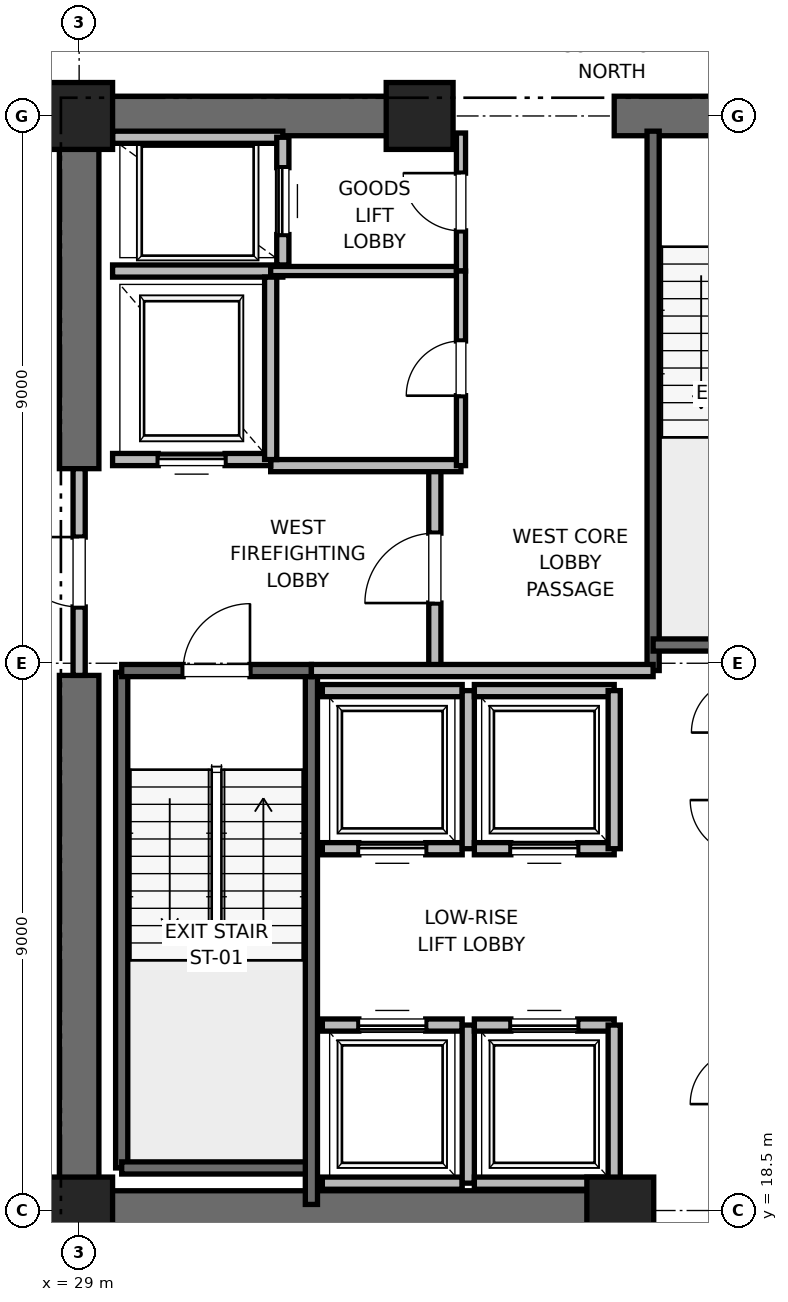
"""IFC4 building model, lengths in metres.
Left out: names, types, materials, properties, quantities, classifications, styles, units other than length and angle.
Written with IfcOpenShell. Run it as: python <this file> out.ifc"""

import sys

from ifc_helpers import new_model, si_unit, direction, frame, frame_2d, origin, origin_2d, place, context, subcontext, project, spatial, rectangle, extrude, element, fill, save


model = new_model("IFC4")
c1 = context("Model", 3, precision=1e-05, world=origin(), true_north=direction((0.0, 1.0)))
c2 = subcontext(c1, "Body", "Model", "MODEL_VIEW")
j1 = project(units=[si_unit("LENGTHUNIT", "METRE"), si_unit("PLANEANGLEUNIT", "RADIAN")], contexts=[c1])
p1 = place(None, origin())
s1 = spatial("IfcSite", under=j1, at=p1, CompositionType="ELEMENT")
p2 = place(p1, origin())
s2 = spatial("IfcBuilding", under=s1, at=p2, CompositionType="ELEMENT")
p3 = place(p2, frame((0.0, 0.0, 55.6)))
s3 = spatial("IfcBuildingStorey", under=s2, at=p3, CompositionType="ELEMENT", Elevation=55.6)
for number, where, z_axis, x_axis in (
    (1, (29.0, 18.5, 0.0), (0.0, 0.0, 1.0), (1.0, 0.0, 0.0)),
    (2, (29.0, 36.5, 0.0), (0.0, 0.0, 1.0), (1.0, 0.0, 0.0)),
    (3, (37.9, 18.5, 0.0), (0.0, 0.0, 1.0), (1.0, 0.0, 0.0)),
    (4, (34.6, 36.5, 0.0), (0.0, 0.0, 1.0), (1.0, 0.0, 0.0)),
):
    element("IfcColumn", number, at=place(p3, frame(where, z_axis=z_axis, x_axis=x_axis)), inside=s3, PredefinedType="PILASTER", context=c2, shape_type="SweptSolid", body=[
        extrude(rectangle(XDim=1.1, YDim=1.1, at=origin_2d()), origin(), (0.0, 0.0, 1.0), 4.0),
    ])
p4 = place(p3, frame((29.0, 18.5, 0.0), z_axis=(0.0, 0.0, 1.0), x_axis=(1.0, 0.0, 0.0)))
e5 = element("IfcWall", 5, at=p4, inside=s3, PredefinedType="SHEAR", context=c2, shape_type="SweptSolid", body=[
    extrude(rectangle(XDim=9.2, YDim=0.65, at=frame_2d((4.6, 0.0))), origin(), (0.0, 0.0, 1.0), 3.76),
])
p5 = place(p3, frame((29.0, 36.5, 0.0), z_axis=(0.0, 0.0, 1.0), x_axis=(1.0, 0.0, 0.0)))
e6 = element("IfcWall", 6, at=p5, inside=s3, PredefinedType="SHEAR", context=c2, shape_type="SweptSolid", body=[
    extrude(rectangle(XDim=5.8, YDim=0.65, at=frame_2d((2.9, 0.0))), origin(), (0.0, 0.0, 1.0), 3.76),
])
p6 = place(p3, frame((37.8, 36.5, 0.0), z_axis=(0.0, 0.0, 1.0), x_axis=(1.0, 0.0, 0.0)))
e7 = element("IfcWall", 7, at=p6, inside=s3, PredefinedType="SHEAR", context=c2, shape_type="SweptSolid", body=[
    extrude(rectangle(XDim=4.4, YDim=0.65, at=frame_2d((2.2, 0.0))), origin(), (0.0, 0.0, 1.0), 3.76),
])
p7 = place(p6, frame((1.65, 0.0, 0.0)))
e8 = element("IfcOpeningElement", 8, at=p7, cuts=e7, PredefinedType="OPENING", context=c2, shape_type="SweptSolid", body=[
    extrude(rectangle(XDim=1.1, YDim=2.15, at=frame_2d((0.55, 1.075))), frame((0.0, 0.325, 0.0), z_axis=(0.0, -1.0, 0.0), x_axis=(1.0, 0.0, 0.0)), (0.0, 0.0, 1.0), 0.65),
])
p8 = place(p3, frame((29.0, 18.5, 0.0), z_axis=(0.0, 0.0, 1.0), x_axis=(0.0, 1.0, 0.0)))
e9 = element("IfcWall", 9, at=p8, inside=s3, PredefinedType="SHEAR", context=c2, shape_type="SweptSolid", body=[
    extrude(rectangle(XDim=8.8, YDim=0.65, at=frame_2d((4.4, 0.0))), origin(), (0.0, 0.0, 1.0), 3.76),
])
p9 = place(p3, frame((29.0, 30.7, 0.0), z_axis=(0.0, 0.0, 1.0), x_axis=(0.0, 1.0, 0.0)))
e10 = element("IfcWall", 10, at=p9, inside=s3, PredefinedType="SHEAR", context=c2, shape_type="SweptSolid", body=[
    extrude(rectangle(XDim=5.8, YDim=0.65, at=frame_2d((2.9, 0.0))), origin(), (0.0, 0.0, 1.0), 3.76),
])
p10 = place(p3, frame((29.7, 19.2, 0.0), z_axis=(0.0, 0.0, 1.0), x_axis=(0.0, 1.0, 0.0)))
e11 = element("IfcWall", 11, at=p10, inside=s3, PredefinedType="SOLIDWALL", context=c2, shape_type="SweptSolid", body=[
    extrude(rectangle(XDim=8.15, YDim=0.2, at=frame_2d((4.075, 0.0))), origin(), (0.0, 0.0, 1.0), 3.76),
])
p11 = place(p3, frame((29.7, 19.2, 0.0), z_axis=(0.0, 0.0, 1.0), x_axis=(1.0, 0.0, 0.0)))
e12 = element("IfcWall", 12, at=p11, inside=s3, PredefinedType="SOLIDWALL", context=c2, shape_type="SweptSolid", body=[
    extrude(rectangle(XDim=3.12, YDim=0.2, at=frame_2d((1.56, 0.0))), origin(), (0.0, 0.0, 1.0), 3.76),
])
p12 = place(p3, frame((32.82, 18.6, 0.0), z_axis=(0.0, 0.0, 1.0), x_axis=(0.0, 1.0, 0.0)))
e13 = element("IfcWall", 13, at=p12, inside=s3, PredefinedType="SOLIDWALL", context=c2, shape_type="SweptSolid", body=[
    extrude(rectangle(XDim=8.78, YDim=0.2, at=frame_2d((4.39, 0.0))), origin(), (0.0, 0.0, 1.0), 3.76),
])
p13 = place(p3, frame((29.7, 27.38, 0.0), z_axis=(0.0, 0.0, 1.0), x_axis=(1.0, 0.0, 0.0)))
e14 = element("IfcWall", 14, at=p13, inside=s3, PredefinedType="SOLIDWALL", context=c2, shape_type="SweptSolid", body=[
    extrude(rectangle(XDim=3.12, YDim=0.2, at=frame_2d((1.56, 0.0))), origin(), (0.0, 0.0, 1.0), 3.76),
])
p14 = place(p13, frame((1.01, 0.0, 0.0)))
e15 = element("IfcOpeningElement", 15, at=p14, cuts=e14, PredefinedType="OPENING", context=c2, shape_type="SweptSolid", body=[
    extrude(rectangle(XDim=1.1, YDim=2.15, at=frame_2d((0.55, 1.075))), frame((0.0, 0.1, 0.0), z_axis=(0.0, -1.0, 0.0), x_axis=(1.0, 0.0, 0.0)), (0.0, 0.0, 1.0), 0.2),
])
p15 = place(p3, frame((38.44, 27.38, 0.0), z_axis=(0.0, 0.0, 1.0), x_axis=(0.0, 1.0, 0.0)))
e16 = element("IfcWall", 16, at=p15, inside=s3, PredefinedType="SOLIDWALL", context=c2, shape_type="SweptSolid", body=[
    extrude(rectangle(XDim=8.87, YDim=0.2, at=frame_2d((4.435, 0.0))), origin(), (0.0, 0.0, 1.0), 3.76),
])
p16 = place(p3, frame((38.44, 27.8, 0.0), z_axis=(0.0, 0.0, 1.0), x_axis=(1.0, 0.0, 0.0)))
e17 = element("IfcWall", 17, at=p16, inside=s3, PredefinedType="SOLIDWALL", context=c2, shape_type="SweptSolid", body=[
    extrude(rectangle(XDim=3.32, YDim=0.2, at=frame_2d((1.66, 0.0))), origin(), (0.0, 0.0, 1.0), 3.76),
])
p17 = place(p3, frame((34.85, 27.38, 0.0), z_axis=(0.0, 0.0, 1.0), x_axis=(0.0, 1.0, 0.0)))
e18 = element("IfcWall", 18, at=p17, inside=s3, PredefinedType="PARTITIONING", context=c2, shape_type="SweptSolid", body=[
    extrude(rectangle(XDim=3.37, YDim=0.2, at=frame_2d((1.685, 0.0))), origin(), (0.0, 0.0, 1.0), 3.76),
])
p18 = place(p17, frame((1.11, 0.0, 0.0)))
e19 = element("IfcOpeningElement", 19, at=p18, cuts=e18, PredefinedType="OPENING", context=c2, shape_type="SweptSolid", body=[
    extrude(rectangle(XDim=1.15, YDim=2.2, at=frame_2d((0.575, 1.1))), frame((0.0, 0.1, 0.0), z_axis=(0.0, -1.0, 0.0), x_axis=(1.0, 0.0, 0.0)), (0.0, 0.0, 1.0), 0.2),
])
p19 = place(p3, frame((29.0, 27.3, 0.0), z_axis=(0.0, 0.0, 1.0), x_axis=(0.0, 1.0, 0.0)))
e20 = element("IfcWall", 20, at=p19, inside=s3, PredefinedType="PARTITIONING", context=c2, shape_type="SweptSolid", body=[
    extrude(rectangle(XDim=3.4, YDim=0.2, at=frame_2d((1.7, 0.0))), origin(), (0.0, 0.0, 1.0), 2.54),
])
p20 = place(p19, frame((1.125, 0.0, 0.0)))
e21 = element("IfcOpeningElement", 21, at=p20, cuts=e20, PredefinedType="OPENING", context=c2, shape_type="SweptSolid", body=[
    extrude(rectangle(XDim=1.15, YDim=2.2, at=frame_2d((0.575, 1.1))), frame((0.0, 0.1, 0.0), z_axis=(0.0, -1.0, 0.0), x_axis=(1.0, 0.0, 0.0)), (0.0, 0.0, 1.0), 0.2),
])
p21 = place(p3, frame((32.82, 27.38, 0.0), z_axis=(0.0, 0.0, 1.0), x_axis=(1.0, 0.0, 0.0)))
e22 = element("IfcWall", 22, at=p21, inside=s3, PredefinedType="PARTITIONING", context=c2, shape_type="SweptSolid", body=[
    extrude(rectangle(XDim=5.62, YDim=0.2, at=frame_2d((2.81, 0.0))), origin(), (0.0, 0.0, 1.0), 3.76),
])
p22 = place(p3, frame((32.15, 30.75, 0.0), z_axis=(0.0, 0.0, 1.0), x_axis=(1.0, 0.0, 0.0)))
e23 = element("IfcWall", 23, at=p22, inside=s3, PredefinedType="PARTITIONING", context=c2, shape_type="SweptSolid", body=[
    extrude(rectangle(XDim=3.13, YDim=0.2, at=frame_2d((1.565, 0.0))), origin(), (0.0, 0.0, 1.0), 3.76),
])
p23 = place(p3, frame((29.55, 30.85, 0.0), z_axis=(0.0, 0.0, 1.0), x_axis=(1.0, 0.0, 0.0)))
e24 = element("IfcWall", 24, at=p23, inside=s3, PredefinedType="SOLIDWALL", context=c2, shape_type="SweptSolid", body=[
    extrude(rectangle(XDim=2.6, YDim=0.2, at=frame_2d((1.3, 0.0))), origin(), (0.0, 0.0, 1.0), 2.54),
])
p24 = place(p23, frame((0.75, 0.0, 0.0)))
e25 = element("IfcOpeningElement", 25, at=p24, cuts=e24, PredefinedType="OPENING", context=c2, shape_type="SweptSolid", body=[
    extrude(rectangle(XDim=1.1, YDim=2.2, at=frame_2d((0.55, 1.1))), frame((0.0, 0.1, 0.0), z_axis=(0.0, -1.0, 0.0), x_axis=(1.0, 0.0, 0.0)), (0.0, 0.0, 1.0), 0.2),
])
p25 = place(p3, frame((29.55, 33.95, 0.0), z_axis=(0.0, 0.0, 1.0), x_axis=(1.0, 0.0, 0.0)))
e26 = element("IfcWall", 26, at=p25, inside=s3, PredefinedType="SOLIDWALL", context=c2, shape_type="SweptSolid", body=[
    extrude(rectangle(XDim=2.8, YDim=0.2, at=frame_2d((1.4, 0.0))), origin(), (0.0, 0.0, 1.0), 3.76),
])
p26 = place(p3, frame((32.15, 30.85, 0.0), z_axis=(0.0, 0.0, 1.0), x_axis=(0.0, 1.0, 0.0)))
e27 = element("IfcWall", 27, at=p26, inside=s3, PredefinedType="SOLIDWALL", context=c2, shape_type="SweptSolid", body=[
    extrude(rectangle(XDim=3.0, YDim=0.2, at=frame_2d((1.5, 0.0))), origin(), (0.0, 0.0, 1.0), 3.76),
])
p27 = place(p3, frame((32.35, 36.15, 0.0), z_axis=(0.0, 0.0, 1.0), x_axis=(-1.0, 0.0, 0.0)))
e28 = element("IfcWall", 28, at=p27, inside=s3, PredefinedType="SOLIDWALL", context=c2, shape_type="SweptSolid", body=[
    extrude(rectangle(XDim=2.8, YDim=0.2, at=frame_2d((1.4, 0.0))), origin(), (0.0, 0.0, 1.0), 2.889),
])
p28 = place(p3, frame((32.35, 34.05, 0.0), z_axis=(0.0, 0.0, 1.0), x_axis=(0.0, 1.0, 0.0)))
e29 = element("IfcWall", 29, at=p28, inside=s3, PredefinedType="SOLIDWALL", context=c2, shape_type="SweptSolid", body=[
    extrude(rectangle(XDim=2.1, YDim=0.2, at=frame_2d((1.05, 0.0))), origin(), (0.0, 0.0, 1.0), 3.76),
])
p29 = place(p28, frame((0.5, 0.0, 0.0)))
e30 = element("IfcOpeningElement", 30, at=p29, cuts=e29, PredefinedType="OPENING", context=c2, shape_type="SweptSolid", body=[
    extrude(rectangle(XDim=1.1, YDim=2.2, at=frame_2d((0.55, 1.1))), frame((0.0, 0.1, 0.0), z_axis=(0.0, -1.0, 0.0), x_axis=(1.0, 0.0, 0.0)), (0.0, 0.0, 1.0), 0.2),
])
p30 = place(p3, frame((33.0, 18.95, 0.0), z_axis=(0.0, 0.0, 1.0), x_axis=(1.0, 0.0, 0.0)))
e31 = element("IfcWall", 31, at=p30, inside=s3, PredefinedType="SOLIDWALL", context=c2, shape_type="SweptSolid", body=[
    extrude(rectangle(XDim=2.3, YDim=0.2, at=frame_2d((1.15, 0.0))), origin(), (0.0, 0.0, 1.0), 3.76),
])
p31 = place(p3, frame((35.3, 21.55, 0.0), z_axis=(0.0, 0.0, 1.0), x_axis=(-1.0, 0.0, 0.0)))
e32 = element("IfcWall", 32, at=p31, inside=s3, PredefinedType="SOLIDWALL", context=c2, shape_type="SweptSolid", body=[
    extrude(rectangle(XDim=2.3, YDim=0.2, at=frame_2d((1.15, 0.0))), origin(), (0.0, 0.0, 1.0), 3.76),
])
p32 = place(p31, frame((0.6, 0.0, 0.0)))
e33 = element("IfcOpeningElement", 33, at=p32, cuts=e32, PredefinedType="OPENING", context=c2, shape_type="SweptSolid", body=[
    extrude(rectangle(XDim=1.1, YDim=2.2, at=frame_2d((0.55, 1.1))), frame((0.0, 0.1, 0.0), z_axis=(0.0, -1.0, 0.0), x_axis=(1.0, 0.0, 0.0)), (0.0, 0.0, 1.0), 0.2),
])
p33 = place(p3, frame((35.4, 18.95, 0.0), z_axis=(0.0, 0.0, 1.0), x_axis=(0.0, 1.0, 0.0)))
e34 = element("IfcWall", 34, at=p33, inside=s3, PredefinedType="SOLIDWALL", context=c2, shape_type="SweptSolid", body=[
    extrude(rectangle(XDim=2.6, YDim=0.2, at=frame_2d((1.3, 0.0))), origin(), (0.0, 0.0, 1.0), 3.76),
])
p34 = place(p3, frame((35.5, 18.95, 0.0), z_axis=(0.0, 0.0, 1.0), x_axis=(1.0, 0.0, 0.0)))
e35 = element("IfcWall", 35, at=p34, inside=s3, PredefinedType="SOLIDWALL", context=c2, shape_type="SweptSolid", body=[
    extrude(rectangle(XDim=2.3, YDim=0.2, at=frame_2d((1.15, 0.0))), origin(), (0.0, 0.0, 1.0), 2.54),
])
p35 = place(p3, frame((37.8, 21.55, 0.0), z_axis=(0.0, 0.0, 1.0), x_axis=(-1.0, 0.0, 0.0)))
e36 = element("IfcWall", 36, at=p35, inside=s3, PredefinedType="SOLIDWALL", context=c2, shape_type="SweptSolid", body=[
    extrude(rectangle(XDim=2.3, YDim=0.2, at=frame_2d((1.15, 0.0))), origin(), (0.0, 0.0, 1.0), 3.76),
])
p36 = place(p35, frame((0.6, 0.0, 0.0)))
e37 = element("IfcOpeningElement", 37, at=p36, cuts=e36, PredefinedType="OPENING", context=c2, shape_type="SweptSolid", body=[
    extrude(rectangle(XDim=1.1, YDim=2.2, at=frame_2d((0.55, 1.1))), frame((0.0, 0.1, 0.0), z_axis=(0.0, -1.0, 0.0), x_axis=(1.0, 0.0, 0.0)), (0.0, 0.0, 1.0), 0.2),
])
p37 = place(p3, frame((37.8, 18.95, 0.0), z_axis=(0.0, 0.0, 1.0), x_axis=(0.0, 1.0, 0.0)))
e38 = element("IfcWall", 38, at=p37, inside=s3, PredefinedType="SOLIDWALL", context=c2, shape_type="SweptSolid", body=[
    extrude(rectangle(XDim=2.6, YDim=0.2, at=frame_2d((1.3, 0.0))), origin(), (0.0, 0.0, 1.0), 2.54),
])
p38 = place(p3, frame((33.0, 24.45, 0.0), z_axis=(0.0, 0.0, 1.0), x_axis=(1.0, 0.0, 0.0)))
e39 = element("IfcWall", 39, at=p38, inside=s3, PredefinedType="SOLIDWALL", context=c2, shape_type="SweptSolid", body=[
    extrude(rectangle(XDim=2.3, YDim=0.2, at=frame_2d((1.15, 0.0))), origin(), (0.0, 0.0, 1.0), 3.76),
])
p39 = place(p38, frame((0.6, 0.0, 0.0)))
e40 = element("IfcOpeningElement", 40, at=p39, cuts=e39, PredefinedType="OPENING", context=c2, shape_type="SweptSolid", body=[
    extrude(rectangle(XDim=1.1, YDim=2.2, at=frame_2d((0.55, 1.1))), frame((0.0, 0.1, 0.0), z_axis=(0.0, -1.0, 0.0), x_axis=(1.0, 0.0, 0.0)), (0.0, 0.0, 1.0), 0.2),
])
p40 = place(p3, frame((35.3, 27.05, 0.0), z_axis=(0.0, 0.0, 1.0), x_axis=(-1.0, 0.0, 0.0)))
e41 = element("IfcWall", 41, at=p40, inside=s3, PredefinedType="SOLIDWALL", context=c2, shape_type="SweptSolid", body=[
    extrude(rectangle(XDim=2.3, YDim=0.2, at=frame_2d((1.15, 0.0))), origin(), (0.0, 0.0, 1.0), 3.76),
])
p41 = place(p3, frame((35.4, 24.45, 0.0), z_axis=(0.0, 0.0, 1.0), x_axis=(0.0, 1.0, 0.0)))
e42 = element("IfcWall", 42, at=p41, inside=s3, PredefinedType="SOLIDWALL", context=c2, shape_type="SweptSolid", body=[
    extrude(rectangle(XDim=2.6, YDim=0.2, at=frame_2d((1.3, 0.0))), origin(), (0.0, 0.0, 1.0), 3.76),
])
p42 = place(p3, frame((35.5, 24.45, 0.0), z_axis=(0.0, 0.0, 1.0), x_axis=(1.0, 0.0, 0.0)))
e43 = element("IfcWall", 43, at=p42, inside=s3, PredefinedType="SOLIDWALL", context=c2, shape_type="SweptSolid", body=[
    extrude(rectangle(XDim=2.3, YDim=0.2, at=frame_2d((1.15, 0.0))), origin(), (0.0, 0.0, 1.0), 3.76),
])
p43 = place(p42, frame((0.6, 0.0, 0.0)))
e44 = element("IfcOpeningElement", 44, at=p43, cuts=e43, PredefinedType="OPENING", context=c2, shape_type="SweptSolid", body=[
    extrude(rectangle(XDim=1.1, YDim=2.2, at=frame_2d((0.55, 1.1))), frame((0.0, 0.1, 0.0), z_axis=(0.0, -1.0, 0.0), x_axis=(1.0, 0.0, 0.0)), (0.0, 0.0, 1.0), 0.2),
])
p44 = place(p3, frame((37.8, 27.05, 0.0), z_axis=(0.0, 0.0, 1.0), x_axis=(-1.0, 0.0, 0.0)))
e45 = element("IfcWall", 45, at=p44, inside=s3, PredefinedType="SOLIDWALL", context=c2, shape_type="SweptSolid", body=[
    extrude(rectangle(XDim=2.3, YDim=0.2, at=frame_2d((1.15, 0.0))), origin(), (0.0, 0.0, 1.0), 3.76),
])
p45 = place(p3, frame((37.8, 24.45, 0.0), z_axis=(0.0, 0.0, 1.0), x_axis=(0.0, 1.0, 0.0)))
e46 = element("IfcWall", 46, at=p45, inside=s3, PredefinedType="SOLIDWALL", context=c2, shape_type="SweptSolid", body=[
    extrude(rectangle(XDim=2.6, YDim=0.2, at=frame_2d((1.3, 0.0))), origin(), (0.0, 0.0, 1.0), 3.76),
])
p46 = place(p3, frame((32.15, 33.95, 0.0), z_axis=(0.0, 0.0, 1.0), x_axis=(1.0, 0.0, 0.0)))
e47 = element("IfcWall", 47, at=p46, inside=s3, PredefinedType="PARTITIONING", context=c2, shape_type="SweptSolid", body=[
    extrude(rectangle(XDim=3.13, YDim=0.15, at=frame_2d((1.565, 0.0))), origin(), (0.0, 0.0, 1.0), 2.85),
])
p47 = place(p3, frame((35.28, 33.95, 0.0), z_axis=(0.0, 0.0, 1.0), x_axis=(0.0, 1.0, 0.0)))
e48 = element("IfcWall", 48, at=p47, inside=s3, PredefinedType="PARTITIONING", context=c2, shape_type="SweptSolid", body=[
    extrude(rectangle(XDim=2.27, YDim=0.15, at=frame_2d((1.135, 0.0))), origin(), (0.0, 0.0, 1.0), 2.54),
])
p48 = place(p47, frame((0.66, 0.0, 0.0)))
e49 = element("IfcOpeningElement", 49, at=p48, cuts=e48, PredefinedType="OPENING", context=c2, shape_type="SweptSolid", body=[
    extrude(rectangle(XDim=0.95, YDim=2.15, at=frame_2d((0.475, 1.075))), frame((0.0, 0.075, 0.0), z_axis=(0.0, -1.0, 0.0), x_axis=(1.0, 0.0, 0.0)), (0.0, 0.0, 1.0), 0.15),
])
p49 = place(p3, frame((35.28, 30.75, 0.0), z_axis=(0.0, 0.0, 1.0), x_axis=(0.0, 1.0, 0.0)))
e50 = element("IfcWall", 50, at=p49, inside=s3, PredefinedType="PARTITIONING", context=c2, shape_type="SweptSolid", body=[
    extrude(rectangle(XDim=3.2, YDim=0.15, at=frame_2d((1.6, 0.0))), origin(), (0.0, 0.0, 1.0), 2.85),
])
p50 = place(p49, frame((1.15, 0.0, 0.0)))
e51 = element("IfcOpeningElement", 51, at=p50, cuts=e50, PredefinedType="OPENING", context=c2, shape_type="SweptSolid", body=[
    extrude(rectangle(XDim=0.9, YDim=2.1, at=frame_2d((0.45, 1.05))), frame((0.0, 0.075, 0.0), z_axis=(0.0, -1.0, 0.0), x_axis=(1.0, 0.0, 0.0)), (0.0, 0.0, 1.0), 0.15),
])
p51 = place(p14, origin())
e52 = element("IfcDoor", 52, at=p51, inside=s3, OperationType="SINGLE_SWING_RIGHT", PredefinedType="DOOR", context=c2, shape_type="SweptSolid", body=[
    extrude(rectangle(XDim=1.1, YDim=2.15, at=frame_2d((0.55, 1.075))), frame((0.0, 0.025, 0.0), z_axis=(0.0, -1.0, 0.0), x_axis=(1.0, 0.0, 0.0)), (0.0, 0.0, 1.0), 0.05),
])
fill(e15, e52)
p52 = place(p18, origin())
e53 = element("IfcDoor", 53, at=p52, inside=s3, OperationType="SINGLE_SWING_LEFT", PredefinedType="DOOR", context=c2, shape_type="SweptSolid", body=[
    extrude(rectangle(XDim=1.15, YDim=2.2, at=frame_2d((0.575, 1.1))), frame((0.0, 0.025, 0.0), z_axis=(0.0, -1.0, 0.0), x_axis=(1.0, 0.0, 0.0)), (0.0, 0.0, 1.0), 0.05),
])
fill(e19, e53)
p53 = place(p20, origin())
e54 = element("IfcDoor", 54, at=p53, inside=s3, OperationType="SINGLE_SWING_RIGHT", PredefinedType="DOOR", context=c2, shape_type="SweptSolid", body=[
    extrude(rectangle(XDim=1.15, YDim=2.2, at=frame_2d((0.575, 1.1))), frame((0.0, 0.025, 0.0), z_axis=(0.0, -1.0, 0.0), x_axis=(1.0, 0.0, 0.0)), (0.0, 0.0, 1.0), 0.05),
])
fill(e21, e54)
p54 = place(p24, origin())
e55 = element("IfcDoor", 55, at=p54, inside=s3, OperationType="SLIDING_TO_RIGHT", PredefinedType="DOOR", context=c2, shape_type="SweptSolid", body=[
    extrude(rectangle(XDim=1.1, YDim=2.2, at=frame_2d((0.55, 1.1))), frame((0.0, 0.025, 0.0), z_axis=(0.0, -1.0, 0.0), x_axis=(1.0, 0.0, 0.0)), (0.0, 0.0, 1.0), 0.05),
])
fill(e25, e55)
p55 = place(p29, origin())
e56 = element("IfcDoor", 56, at=p55, inside=s3, OperationType="SLIDING_TO_RIGHT", PredefinedType="DOOR", context=c2, shape_type="SweptSolid", body=[
    extrude(rectangle(XDim=1.1, YDim=2.2, at=frame_2d((0.55, 1.1))), frame((0.0, 0.025, 0.0), z_axis=(0.0, -1.0, 0.0), x_axis=(1.0, 0.0, 0.0)), (0.0, 0.0, 1.0), 0.05),
])
fill(e30, e56)
p56 = place(p32, origin())
e57 = element("IfcDoor", 57, at=p56, inside=s3, OperationType="SLIDING_TO_RIGHT", PredefinedType="DOOR", context=c2, shape_type="SweptSolid", body=[
    extrude(rectangle(XDim=1.1, YDim=2.2, at=frame_2d((0.55, 1.1))), frame((0.0, 0.025, 0.0), z_axis=(0.0, -1.0, 0.0), x_axis=(1.0, 0.0, 0.0)), (0.0, 0.0, 1.0), 0.05),
])
fill(e33, e57)
p57 = place(p36, origin())
e58 = element("IfcDoor", 58, at=p57, inside=s3, OperationType="SLIDING_TO_RIGHT", PredefinedType="DOOR", context=c2, shape_type="SweptSolid", body=[
    extrude(rectangle(XDim=1.1, YDim=2.2, at=frame_2d((0.55, 1.1))), frame((0.0, 0.025, 0.0), z_axis=(0.0, -1.0, 0.0), x_axis=(1.0, 0.0, 0.0)), (0.0, 0.0, 1.0), 0.05),
])
fill(e37, e58)
p58 = place(p39, origin())
e59 = element("IfcDoor", 59, at=p58, inside=s3, OperationType="SLIDING_TO_RIGHT", PredefinedType="DOOR", context=c2, shape_type="SweptSolid", body=[
    extrude(rectangle(XDim=1.1, YDim=2.2, at=frame_2d((0.55, 1.1))), frame((0.0, 0.025, 0.0), z_axis=(0.0, -1.0, 0.0), x_axis=(1.0, 0.0, 0.0)), (0.0, 0.0, 1.0), 0.05),
])
fill(e40, e59)
p59 = place(p43, origin())
e60 = element("IfcDoor", 60, at=p59, inside=s3, OperationType="SLIDING_TO_RIGHT", PredefinedType="DOOR", context=c2, shape_type="SweptSolid", body=[
    extrude(rectangle(XDim=1.1, YDim=2.2, at=frame_2d((0.55, 1.1))), frame((0.0, 0.025, 0.0), z_axis=(0.0, -1.0, 0.0), x_axis=(1.0, 0.0, 0.0)), (0.0, 0.0, 1.0), 0.05),
])
fill(e44, e60)
p60 = place(p48, origin())
e61 = element("IfcDoor", 61, at=p60, inside=s3, OperationType="SINGLE_SWING_RIGHT", PredefinedType="DOOR", context=c2, shape_type="SweptSolid", body=[
    extrude(rectangle(XDim=0.95, YDim=2.15, at=frame_2d((0.475, 1.075))), frame((0.0, 0.025, 0.0), z_axis=(0.0, -1.0, 0.0), x_axis=(1.0, 0.0, 0.0)), (0.0, 0.0, 1.0), 0.05),
])
fill(e49, e61)
p61 = place(p50, origin())
e62 = element("IfcDoor", 62, at=p61, inside=s3, OperationType="SINGLE_SWING_LEFT", PredefinedType="DOOR", context=c2, shape_type="SweptSolid", body=[
    extrude(rectangle(XDim=0.9, YDim=2.1, at=frame_2d((0.45, 1.05))), frame((0.0, 0.025, 0.0), z_axis=(0.0, -1.0, 0.0), x_axis=(1.0, 0.0, 0.0)), (0.0, 0.0, 1.0), 0.05),
])
fill(e51, e62)
save(model, sys.argv[1])
